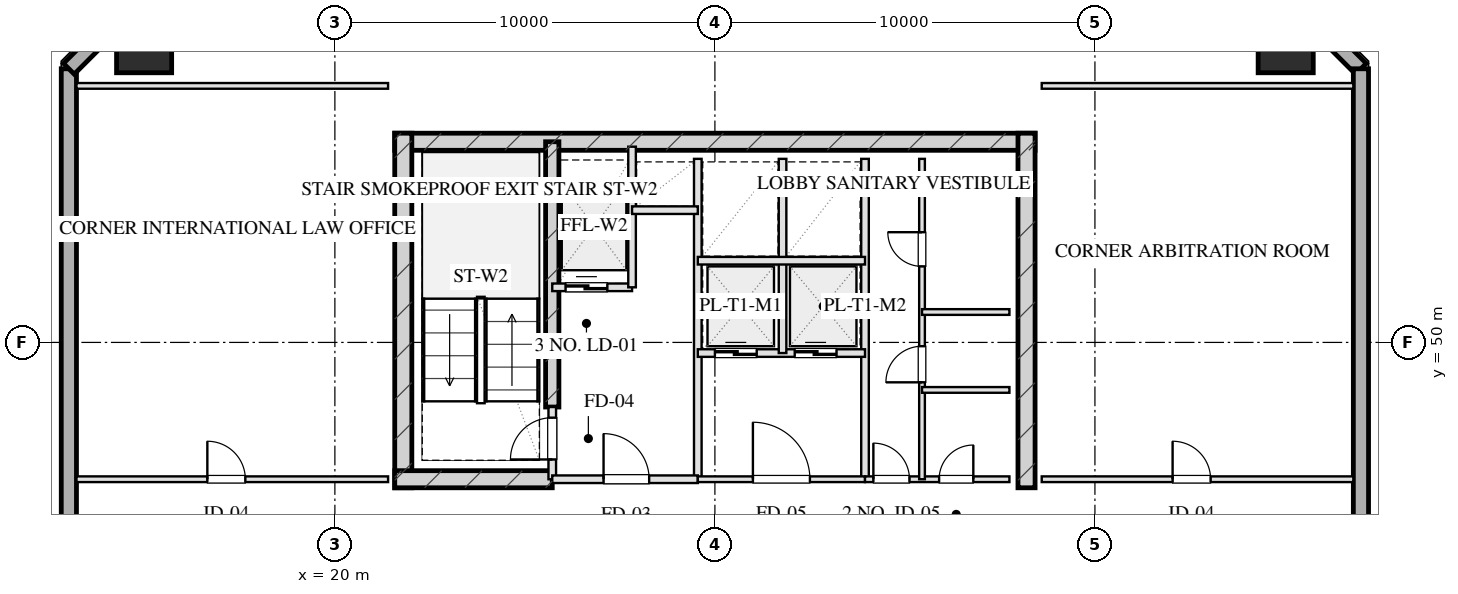
"""IFC4 building model, lengths in metres.
Left out: names, types, materials, properties, quantities, classifications, styles, units other than length and angle.
Written with IfcOpenShell. Run it as: python <this file> out.ifc"""

import sys

from ifc_helpers import new_model, si_unit, direction, frame, frame_2d, origin, origin_2d, place, context, subcontext, project, spatial, rectangle, hollow_rectangle, extrude, element, fill, save


model = new_model("IFC4")
c1 = context("Model", 3, precision=1e-05, world=origin(), true_north=direction((0.0, 1.0)))
c2 = subcontext(c1, "Body", "Model", "MODEL_VIEW")
j1 = project(units=[si_unit("LENGTHUNIT", "METRE"), si_unit("PLANEANGLEUNIT", "RADIAN")], contexts=[c1])
p1 = place(None, origin())
s1 = spatial("IfcSite", under=j1, at=p1, CompositionType="ELEMENT")
p2 = place(p1, origin())
s2 = spatial("IfcBuilding", under=s1, at=p2, CompositionType="ELEMENT")
p3 = place(p2, frame((0.0, 0.0, 195.5)))
s3 = spatial("IfcBuildingStorey", under=s2, at=p3, CompositionType="ELEMENT", Elevation=195.5)
p4 = place(p3, frame((21.575, 55.28, 0.0), z_axis=(0.0, 0.0, 1.0), x_axis=(1.0, 0.0, 0.0)))
e1 = element("IfcWall", 1, at=p4, inside=s3, PredefinedType="SHEAR", context=c2, shape_type="SweptSolid", body=[
    extrude(rectangle(XDim=16.85, YDim=0.45, at=frame_2d((8.425, 0.0))), origin(), (0.0, 0.0, 1.0), 3.45),
])
for number, where, z_axis, x_axis in (
    (2, (21.8, 46.175, 0.0), (0.0, 0.0, 1.0), (0.0, 1.0, 0.0)),
    (3, (38.2, 46.175, 0.0), (0.0, 0.0, 1.0), (0.0, 1.0, 0.0)),
):
    element("IfcWall", number, at=place(p3, frame(where, z_axis=z_axis, x_axis=x_axis)), inside=s3, PredefinedType="SHEAR", context=c2, shape_type="SweptSolid", body=[
        extrude(rectangle(XDim=9.33, YDim=0.45, at=frame_2d((4.665, 0.0))), origin(), (0.0, 0.0, 1.0), 3.45),
    ])
p5 = place(p3, frame((25.72, 48.3, 0.0), z_axis=(0.0, 0.0, 1.0), x_axis=(0.0, 1.0, 0.0)))
e4 = element("IfcWall", 4, at=p5, inside=s3, PredefinedType="SHEAR", context=c2, shape_type="SweptSolid", body=[
    extrude(rectangle(XDim=6.98, YDim=0.35, at=frame_2d((3.49, 0.0))), origin(), (0.0, 0.0, 1.0), 3.45),
])
p6 = place(p3, frame((21.575, 46.4, 0.0), z_axis=(0.0, 0.0, 1.0), x_axis=(1.0, 0.0, 0.0)))
e5 = element("IfcWall", 5, at=p6, inside=s3, PredefinedType="SHEAR", context=c2, shape_type="SweptSolid", body=[
    extrude(rectangle(XDim=4.145, YDim=0.45, at=frame_2d((2.073, 0.0))), origin(), (0.0, 0.0, 1.0), 3.45),
])
for number, where, z_axis, x_axis in (
    (6, (45.02, 57.82, 0.0), (0.0, 0.0, 1.0), (1.0, 0.0, 0.0)),
    (7, (14.98, 57.82, 0.0), (0.0, 0.0, 1.0), (1.0, 0.0, 0.0)),
):
    element("IfcColumn", number, at=place(p3, frame(where, z_axis=z_axis, x_axis=x_axis)), inside=s3, PredefinedType="COLUMN", context=c2, shape_type="SweptSolid", body=[
        extrude(hollow_rectangle(XDim=1.45, YDim=1.45, WallThickness=0.05, at=origin_2d()), origin(), (0.0, 0.0, 1.0), 3.451),
    ])
p7 = place(p3, frame((13.0, 10.8, 0.0), z_axis=(0.0, 0.0, 1.0), x_axis=(0.0, 1.0, 0.0)))
e8 = element("IfcWall", 8, at=p7, inside=s3, PredefinedType="SOLIDWALL", context=c2, shape_type="SweptSolid", body=[
    extrude(rectangle(XDim=46.4, YDim=0.4, at=frame_2d((23.2, 0.0))), origin(), (0.0, 0.0, 1.0), 2.61),
])
p8 = place(p7, frame((24.75, 0.0, 0.75)))
e9 = element("IfcOpeningElement", 9, at=p8, cuts=e8, PredefinedType="OPENING", context=c2, shape_type="SweptSolid", body=[
    extrude(rectangle(XDim=2.1, YDim=1.46, at=frame_2d((1.05, 0.73))), frame((0.0, 0.21, 0.0), z_axis=(0.0, -1.0, 0.0), x_axis=(1.0, 0.0, 0.0)), (0.0, 0.0, 1.0), 0.42),
])
p9 = place(p7, frame((28.55, 0.0, 0.75)))
e10 = element("IfcOpeningElement", 10, at=p9, cuts=e8, PredefinedType="OPENING", context=c2, shape_type="SweptSolid", body=[
    extrude(rectangle(XDim=2.1, YDim=1.46, at=frame_2d((1.05, 0.73))), frame((0.0, 0.21, 0.0), z_axis=(0.0, -1.0, 0.0), x_axis=(1.0, 0.0, 0.0)), (0.0, 0.0, 1.0), 0.42),
])
p10 = place(p7, frame((19.55, 0.0, 0.0)))
e11 = element("IfcOpeningElement", 11, at=p10, cuts=e8, PredefinedType="OPENING", context=c2, shape_type="SweptSolid", body=[
    extrude(rectangle(XDim=1.1, YDim=2.15, at=frame_2d((0.55, 1.075))), frame((0.0, 0.21, 0.0), z_axis=(0.0, -1.0, 0.0), x_axis=(1.0, 0.0, 0.0)), (0.0, 0.0, 1.0), 0.42),
])
for number, where, z_axis, x_axis in (
    (12, (13.0, 57.2, 0.0), (0.0, 0.0, 1.0), (0.707, 0.707, 0.0)),
    (13, (44.4, 59.8, 0.0), (0.0, 0.0, 1.0), (0.707, -0.707, 0.0)),
):
    element("IfcWall", number, at=place(p3, frame(where, z_axis=z_axis, x_axis=x_axis)), inside=s3, PredefinedType="SOLIDWALL", context=c2, shape_type="SweptSolid", body=[
        extrude(rectangle(XDim=3.677, YDim=0.4, at=frame_2d((1.838, 0.0))), origin(), (0.0, 0.0, 1.0), 2.61),
    ])
p11 = place(p3, frame((47.0, 57.2, 0.0), z_axis=(0.0, 0.0, 1.0), x_axis=(0.0, -1.0, 0.0)))
e14 = element("IfcWall", 14, at=p11, inside=s3, PredefinedType="SOLIDWALL", context=c2, shape_type="SweptSolid", body=[
    extrude(rectangle(XDim=46.4, YDim=0.4, at=frame_2d((23.2, 0.0))), origin(), (0.0, 0.0, 1.0), 2.61),
])
p12 = place(p11, frame((19.55, 0.0, 0.75)))
e15 = element("IfcOpeningElement", 15, at=p12, cuts=e14, PredefinedType="OPENING", context=c2, shape_type="SweptSolid", body=[
    extrude(rectangle(XDim=2.1, YDim=1.46, at=frame_2d((1.05, 0.73))), frame((0.0, 0.21, 0.0), z_axis=(0.0, -1.0, 0.0), x_axis=(1.0, 0.0, 0.0)), (0.0, 0.0, 1.0), 0.42),
])
p13 = place(p11, frame((15.75, 0.0, 0.75)))
e16 = element("IfcOpeningElement", 16, at=p13, cuts=e14, PredefinedType="OPENING", context=c2, shape_type="SweptSolid", body=[
    extrude(rectangle(XDim=2.1, YDim=1.46, at=frame_2d((1.05, 0.73))), frame((0.0, 0.21, 0.0), z_axis=(0.0, -1.0, 0.0), x_axis=(1.0, 0.0, 0.0)), (0.0, 0.0, 1.0), 0.42),
])
p14 = place(p11, frame((27.05, 0.0, 0.0)))
e17 = element("IfcOpeningElement", 17, at=p14, cuts=e14, PredefinedType="OPENING", context=c2, shape_type="SweptSolid", body=[
    extrude(rectangle(XDim=1.1, YDim=2.15, at=frame_2d((0.55, 1.075))), frame((0.0, 0.21, 0.0), z_axis=(0.0, -1.0, 0.0), x_axis=(1.0, 0.0, 0.0)), (0.0, 0.0, 1.0), 0.42),
])
p15 = place(p3, frame((25.72, 46.4, 0.0), z_axis=(0.0, 0.0, 1.0), x_axis=(0.0, 1.0, 0.0)))
e18 = element("IfcWall", 18, at=p15, inside=s3, PredefinedType="PARTITIONING", context=c2, shape_type="SweptSolid", body=[
    extrude(rectangle(XDim=1.9, YDim=0.2, at=frame_2d((0.95, 0.0))), origin(), (0.0, 0.0, 1.0), 3.175),
])
p16 = place(p15, frame((0.52, 0.0, 0.0)))
e19 = element("IfcOpeningElement", 19, at=p16, cuts=e18, PredefinedType="OPENING", context=c2, shape_type="SweptSolid", body=[
    extrude(rectangle(XDim=1.1, YDim=2.05, at=frame_2d((0.55, 1.025))), frame((0.0, 0.11, 0.0), z_axis=(0.0, -1.0, 0.0), x_axis=(1.0, 0.0, 0.0)), (0.0, 0.0, 1.0), 0.22),
])
p17 = place(p3, frame((29.55, 46.4, 0.0), z_axis=(0.0, 0.0, 1.0), x_axis=(0.0, 1.0, 0.0)))
e20 = element("IfcWall", 20, at=p17, inside=s3, PredefinedType="PARTITIONING", context=c2, shape_type="SweptSolid", body=[
    extrude(rectangle(XDim=8.43, YDim=0.2, at=frame_2d((4.215, 0.0))), origin(), (0.0, 0.0, 1.0), 3.175),
])
p18 = place(p3, frame((25.72, 46.4, 0.0), z_axis=(0.0, 0.0, 1.0), x_axis=(1.0, 0.0, 0.0)))
e21 = element("IfcWall", 21, at=p18, inside=s3, PredefinedType="PARTITIONING", context=c2, shape_type="SweptSolid", body=[
    extrude(rectangle(XDim=3.83, YDim=0.2, at=frame_2d((1.915, 0.0))), origin(), (0.0, 0.0, 1.0), 3.175),
])
p19 = place(p18, frame((1.35, 0.0, 0.0)))
e22 = element("IfcOpeningElement", 22, at=p19, cuts=e21, PredefinedType="OPENING", context=c2, shape_type="SweptSolid", body=[
    extrude(rectangle(XDim=1.2, YDim=2.05, at=frame_2d((0.6, 1.025))), frame((0.0, 0.11, 0.0), z_axis=(0.0, -1.0, 0.0), x_axis=(1.0, 0.0, 0.0)), (0.0, 0.0, 1.0), 0.22),
])
p20 = place(p3, frame((25.72, 51.45, 0.0), z_axis=(0.0, 0.0, 1.0), x_axis=(1.0, 0.0, 0.0)))
e23 = element("IfcWall", 23, at=p20, inside=s3, PredefinedType="PARTITIONING", context=c2, shape_type="SweptSolid", body=[
    extrude(rectangle(XDim=2.1, YDim=0.2, at=frame_2d((1.05, 0.0))), origin(), (0.0, 0.0, 1.0), 3.175),
])
p21 = place(p20, frame((0.35, 0.0, 0.0)))
e24 = element("IfcOpeningElement", 24, at=p21, cuts=e23, PredefinedType="OPENING", context=c2, shape_type="SweptSolid", body=[
    extrude(rectangle(XDim=1.1, YDim=2.05, at=frame_2d((0.55, 1.025))), frame((0.0, 0.11, 0.0), z_axis=(0.0, -1.0, 0.0), x_axis=(1.0, 0.0, 0.0)), (0.0, 0.0, 1.0), 0.22),
])
p22 = place(p3, frame((27.82, 51.45, 0.0), z_axis=(0.0, 0.0, 1.0), x_axis=(0.0, 1.0, 0.0)))
e25 = element("IfcWall", 25, at=p22, inside=s3, PredefinedType="PARTITIONING", context=c2, shape_type="SweptSolid", body=[
    extrude(rectangle(XDim=3.7, YDim=0.2, at=frame_2d((1.85, 0.0))), origin(), (0.0, 0.0, 1.0), 3.175),
])
p23 = place(p3, frame((27.82, 53.48, 0.0), z_axis=(0.0, 0.0, 1.0), x_axis=(1.0, 0.0, 0.0)))
e26 = element("IfcWall", 26, at=p23, inside=s3, PredefinedType="PARTITIONING", context=c2, shape_type="SweptSolid", body=[
    extrude(rectangle(XDim=1.73, YDim=0.2, at=frame_2d((0.865, 0.0))), origin(), (0.0, 0.0, 1.0), 3.175),
])
p24 = place(p3, frame((33.95, 46.4, 0.0), z_axis=(0.0, 0.0, 1.0), x_axis=(0.0, 1.0, 0.0)))
e27 = element("IfcWall", 27, at=p24, inside=s3, PredefinedType="PARTITIONING", context=c2, shape_type="SweptSolid", body=[
    extrude(rectangle(XDim=8.43, YDim=0.2, at=frame_2d((4.215, 0.0))), origin(), (0.0, 0.0, 1.0), 3.175),
])
p25 = place(p3, frame((29.55, 46.4, 0.0), z_axis=(0.0, 0.0, 1.0), x_axis=(1.0, 0.0, 0.0)))
e28 = element("IfcWall", 28, at=p25, inside=s3, PredefinedType="PARTITIONING", context=c2, shape_type="SweptSolid", body=[
    extrude(rectangle(XDim=4.4, YDim=0.15, at=frame_2d((2.2, 0.0))), origin(), (0.0, 0.0, 1.0), 3.175),
])
p26 = place(p25, frame((1.45, 0.0, 0.0)))
e29 = element("IfcOpeningElement", 29, at=p26, cuts=e28, PredefinedType="OPENING", context=c2, shape_type="SweptSolid", body=[
    extrude(rectangle(XDim=1.5, YDim=2.05, at=frame_2d((0.75, 1.025))), frame((0.0, 0.085, 0.0), z_axis=(0.0, -1.0, 0.0), x_axis=(1.0, 0.0, 0.0)), (0.0, 0.0, 1.0), 0.17),
])
p27 = place(p3, frame((29.55, 49.72, 0.0), z_axis=(0.0, 0.0, 1.0), x_axis=(1.0, 0.0, 0.0)))
e30 = element("IfcWall", 30, at=p27, inside=s3, PredefinedType="PARTITIONING", context=c2, shape_type="SweptSolid", body=[
    extrude(rectangle(XDim=4.4, YDim=0.2, at=frame_2d((2.2, 0.0))), origin(), (0.0, 0.0, 1.0), 3.175),
])
p28 = place(p27, frame((0.45, 0.0, 0.0)))
e31 = element("IfcOpeningElement", 31, at=p28, cuts=e30, PredefinedType="OPENING", context=c2, shape_type="SweptSolid", body=[
    extrude(rectangle(XDim=1.1, YDim=2.05, at=frame_2d((0.55, 1.025))), frame((0.0, 0.11, 0.0), z_axis=(0.0, -1.0, 0.0), x_axis=(1.0, 0.0, 0.0)), (0.0, 0.0, 1.0), 0.22),
])
p29 = place(p27, frame((2.55, 0.0, 0.0)))
e32 = element("IfcOpeningElement", 32, at=p29, cuts=e30, PredefinedType="OPENING", context=c2, shape_type="SweptSolid", body=[
    extrude(rectangle(XDim=1.1, YDim=2.05, at=frame_2d((0.55, 1.025))), frame((0.0, 0.11, 0.0), z_axis=(0.0, -1.0, 0.0), x_axis=(1.0, 0.0, 0.0)), (0.0, 0.0, 1.0), 0.22),
])
p30 = place(p3, frame((31.78, 49.72, 0.0), z_axis=(0.0, 0.0, 1.0), x_axis=(0.0, 1.0, 0.0)))
e33 = element("IfcWall", 33, at=p30, inside=s3, PredefinedType="PARTITIONING", context=c2, shape_type="SweptSolid", body=[
    extrude(rectangle(XDim=5.11, YDim=0.2, at=frame_2d((2.555, 0.0))), origin(), (0.0, 0.0, 1.0), 3.175),
])
p31 = place(p3, frame((29.55, 52.15, 0.0), z_axis=(0.0, 0.0, 1.0), x_axis=(1.0, 0.0, 0.0)))
e34 = element("IfcWall", 34, at=p31, inside=s3, PredefinedType="PARTITIONING", context=c2, shape_type="SweptSolid", body=[
    extrude(rectangle(XDim=4.4, YDim=0.2, at=frame_2d((2.2, 0.0))), origin(), (0.0, 0.0, 1.0), 3.175),
])
p32 = place(p3, frame((33.95, 46.4, 0.0), z_axis=(0.0, 0.0, 1.0), x_axis=(1.0, 0.0, 0.0)))
e35 = element("IfcWall", 35, at=p32, inside=s3, PredefinedType="PARTITIONING", context=c2, shape_type="SweptSolid", body=[
    extrude(rectangle(XDim=3.8, YDim=0.15, at=frame_2d((1.9, 0.0))), origin(), (0.0, 0.0, 1.0), 3.175),
])
p33 = place(p32, frame((0.22, 0.0, 0.0)))
e36 = element("IfcOpeningElement", 36, at=p33, cuts=e35, PredefinedType="OPENING", context=c2, shape_type="SweptSolid", body=[
    extrude(rectangle(XDim=0.95, YDim=2.05, at=frame_2d((0.475, 1.025))), frame((0.0, 0.085, 0.0), z_axis=(0.0, -1.0, 0.0), x_axis=(1.0, 0.0, 0.0)), (0.0, 0.0, 1.0), 0.17),
])
p34 = place(p32, frame((1.95, 0.0, 0.0)))
e37 = element("IfcOpeningElement", 37, at=p34, cuts=e35, PredefinedType="OPENING", context=c2, shape_type="SweptSolid", body=[
    extrude(rectangle(XDim=0.9, YDim=2.05, at=frame_2d((0.45, 1.025))), frame((0.0, 0.085, 0.0), z_axis=(0.0, -1.0, 0.0), x_axis=(1.0, 0.0, 0.0)), (0.0, 0.0, 1.0), 0.17),
])
p35 = place(p3, frame((35.45, 46.4, 0.0), z_axis=(0.0, 0.0, 1.0), x_axis=(0.0, 1.0, 0.0)))
e38 = element("IfcWall", 38, at=p35, inside=s3, PredefinedType="PARTITIONING", context=c2, shape_type="SweptSolid", body=[
    extrude(rectangle(XDim=8.43, YDim=0.15, at=frame_2d((4.215, 0.0))), origin(), (0.0, 0.0, 1.0), 2.765),
])
p36 = place(p35, frame((2.55, 0.0, 0.0)))
e39 = element("IfcOpeningElement", 39, at=p36, cuts=e38, PredefinedType="OPENING", context=c2, shape_type="SweptSolid", body=[
    extrude(rectangle(XDim=0.95, YDim=2.05, at=frame_2d((0.475, 1.025))), frame((0.0, 0.085, 0.0), z_axis=(0.0, -1.0, 0.0), x_axis=(1.0, 0.0, 0.0)), (0.0, 0.0, 1.0), 0.17),
])
p37 = place(p35, frame((5.6, 0.0, 0.0)))
e40 = element("IfcOpeningElement", 40, at=p37, cuts=e38, PredefinedType="OPENING", context=c2, shape_type="SweptSolid", body=[
    extrude(rectangle(XDim=0.9, YDim=2.05, at=frame_2d((0.45, 1.025))), frame((0.0, 0.085, 0.0), z_axis=(0.0, -1.0, 0.0), x_axis=(1.0, 0.0, 0.0)), (0.0, 0.0, 1.0), 0.17),
])
for number, where, z_axis, x_axis in (
    (41, (35.45, 50.8, 0.0), (0.0, 0.0, 1.0), (1.0, 0.0, 0.0)),
    (42, (35.45, 48.75, 0.0), (0.0, 0.0, 1.0), (1.0, 0.0, 0.0)),
):
    element("IfcWall", number, at=place(p3, frame(where, z_axis=z_axis, x_axis=x_axis)), inside=s3, PredefinedType="PARTITIONING", context=c2, shape_type="SweptSolid", body=[
        extrude(rectangle(XDim=2.3, YDim=0.15, at=frame_2d((1.15, 0.0))), origin(), (0.0, 0.0, 1.0), 3.175),
    ])
p38 = place(p3, frame((13.2, 56.75, 0.0), z_axis=(0.0, 0.0, 1.0), x_axis=(1.0, 0.0, 0.0)))
e43 = element("IfcWall", 43, at=p38, inside=s3, PredefinedType="PARTITIONING", context=c2, shape_type="SweptSolid", body=[
    extrude(rectangle(XDim=8.2, YDim=0.15, at=frame_2d((4.1, 0.0))), origin(), (0.0, 0.0, 1.0), 3.175),
])
p39 = place(p3, frame((13.2, 46.4, 0.0), z_axis=(0.0, 0.0, 1.0), x_axis=(1.0, 0.0, 0.0)))
e44 = element("IfcWall", 44, at=p39, inside=s3, PredefinedType="PARTITIONING", context=c2, shape_type="SweptSolid", body=[
    extrude(rectangle(XDim=8.2, YDim=0.15, at=frame_2d((4.1, 0.0))), origin(), (0.0, 0.0, 1.0), 3.175),
])
p40 = place(p39, frame((3.444, 0.0, 0.0)))
e45 = element("IfcOpeningElement", 45, at=p40, cuts=e44, PredefinedType="OPENING", context=c2, shape_type="SweptSolid", body=[
    extrude(rectangle(XDim=1.0, YDim=2.05, at=frame_2d((0.5, 1.025))), frame((0.0, 0.085, 0.0), z_axis=(0.0, -1.0, 0.0), x_axis=(1.0, 0.0, 0.0)), (0.0, 0.0, 1.0), 0.17),
])
p41 = place(p3, frame((38.6, 56.75, 0.0), z_axis=(0.0, 0.0, 1.0), x_axis=(1.0, 0.0, 0.0)))
e46 = element("IfcWall", 46, at=p41, inside=s3, PredefinedType="PARTITIONING", context=c2, shape_type="SweptSolid", body=[
    extrude(rectangle(XDim=8.2, YDim=0.15, at=frame_2d((4.1, 0.0))), origin(), (0.0, 0.0, 1.0), 3.175),
])
p42 = place(p3, frame((38.6, 46.4, 0.0), z_axis=(0.0, 0.0, 1.0), x_axis=(1.0, 0.0, 0.0)))
e47 = element("IfcWall", 47, at=p42, inside=s3, PredefinedType="PARTITIONING", context=c2, shape_type="SweptSolid", body=[
    extrude(rectangle(XDim=8.2, YDim=0.15, at=frame_2d((4.1, 0.0))), origin(), (0.0, 0.0, 1.0), 3.175),
])
p43 = place(p42, frame((3.444, 0.0, 0.0)))
e48 = element("IfcOpeningElement", 48, at=p43, cuts=e47, PredefinedType="OPENING", context=c2, shape_type="SweptSolid", body=[
    extrude(rectangle(XDim=1.0, YDim=2.05, at=frame_2d((0.5, 1.025))), frame((0.0, 0.085, 0.0), z_axis=(0.0, -1.0, 0.0), x_axis=(1.0, 0.0, 0.0)), (0.0, 0.0, 1.0), 0.17),
])
p44 = place(p16, origin())
e49 = element("IfcDoor", 49, at=p44, inside=s3, OperationType="SINGLE_SWING_LEFT", PredefinedType="DOOR", context=c2, shape_type="SweptSolid", body=[
    extrude(rectangle(XDim=1.1, YDim=2.05, at=frame_2d((0.55, 1.025))), frame((0.0, 0.025, 0.0), z_axis=(0.0, -1.0, 0.0), x_axis=(1.0, 0.0, 0.0)), (0.0, 0.0, 1.0), 0.05),
])
fill(e19, e49)
p45 = place(p19, origin())
e50 = element("IfcDoor", 50, at=p45, inside=s3, OperationType="SINGLE_SWING_LEFT", PredefinedType="DOOR", context=c2, shape_type="SweptSolid", body=[
    extrude(rectangle(XDim=1.2, YDim=2.05, at=frame_2d((0.6, 1.025))), frame((0.0, 0.025, 0.0), z_axis=(0.0, -1.0, 0.0), x_axis=(1.0, 0.0, 0.0)), (0.0, 0.0, 1.0), 0.05),
])
fill(e22, e50)
p46 = place(p21, origin())
e51 = element("IfcDoor", 51, at=p46, inside=s3, OperationType="DOUBLE_DOOR_SLIDING", PredefinedType="DOOR", context=c2, shape_type="SweptSolid", body=[
    extrude(rectangle(XDim=1.1, YDim=2.05, at=frame_2d((0.55, 1.025))), frame((0.0, 0.025, 0.0), z_axis=(0.0, -1.0, 0.0), x_axis=(1.0, 0.0, 0.0)), (0.0, 0.0, 1.0), 0.05),
])
fill(e24, e51)
p47 = place(p26, origin())
e52 = element("IfcDoor", 52, at=p47, inside=s3, OperationType="SINGLE_SWING_LEFT", PredefinedType="DOOR", context=c2, shape_type="SweptSolid", body=[
    extrude(rectangle(XDim=1.5, YDim=2.05, at=frame_2d((0.75, 1.025))), frame((0.0, 0.025, 0.0), z_axis=(0.0, -1.0, 0.0), x_axis=(1.0, 0.0, 0.0)), (0.0, 0.0, 1.0), 0.05),
])
fill(e29, e52)
p48 = place(p28, origin())
e53 = element("IfcDoor", 53, at=p48, inside=s3, OperationType="DOUBLE_DOOR_SLIDING", PredefinedType="DOOR", context=c2, shape_type="SweptSolid", body=[
    extrude(rectangle(XDim=1.1, YDim=2.05, at=frame_2d((0.55, 1.025))), frame((0.0, 0.025, 0.0), z_axis=(0.0, -1.0, 0.0), x_axis=(1.0, 0.0, 0.0)), (0.0, 0.0, 1.0), 0.05),
])
fill(e31, e53)
p49 = place(p29, origin())
e54 = element("IfcDoor", 54, at=p49, inside=s3, OperationType="DOUBLE_DOOR_SLIDING", PredefinedType="DOOR", context=c2, shape_type="SweptSolid", body=[
    extrude(rectangle(XDim=1.1, YDim=2.05, at=frame_2d((0.55, 1.025))), frame((0.0, 0.025, 0.0), z_axis=(0.0, -1.0, 0.0), x_axis=(1.0, 0.0, 0.0)), (0.0, 0.0, 1.0), 0.05),
])
fill(e32, e54)
p50 = place(p33, origin())
e55 = element("IfcDoor", 55, at=p50, inside=s3, OperationType="SINGLE_SWING_LEFT", PredefinedType="DOOR", context=c2, shape_type="SweptSolid", body=[
    extrude(rectangle(XDim=0.95, YDim=2.05, at=frame_2d((0.475, 1.025))), frame((0.0, 0.025, 0.0), z_axis=(0.0, -1.0, 0.0), x_axis=(1.0, 0.0, 0.0)), (0.0, 0.0, 1.0), 0.05),
])
fill(e36, e55)
p51 = place(p34, origin())
e56 = element("IfcDoor", 56, at=p51, inside=s3, OperationType="SINGLE_SWING_RIGHT", PredefinedType="DOOR", context=c2, shape_type="SweptSolid", body=[
    extrude(rectangle(XDim=0.9, YDim=2.05, at=frame_2d((0.45, 1.025))), frame((0.0, 0.025, 0.0), z_axis=(0.0, -1.0, 0.0), x_axis=(1.0, 0.0, 0.0)), (0.0, 0.0, 1.0), 0.05),
])
fill(e37, e56)
p52 = place(p36, origin())
e57 = element("IfcDoor", 57, at=p52, inside=s3, OperationType="SINGLE_SWING_LEFT", PredefinedType="DOOR", context=c2, shape_type="SweptSolid", body=[
    extrude(rectangle(XDim=0.95, YDim=2.05, at=frame_2d((0.475, 1.025))), frame((0.0, 0.025, 0.0), z_axis=(0.0, -1.0, 0.0), x_axis=(1.0, 0.0, 0.0)), (0.0, 0.0, 1.0), 0.05),
])
fill(e39, e57)
p53 = place(p37, origin())
e58 = element("IfcDoor", 58, at=p53, inside=s3, OperationType="SINGLE_SWING_RIGHT", PredefinedType="DOOR", context=c2, shape_type="SweptSolid", body=[
    extrude(rectangle(XDim=0.9, YDim=2.05, at=frame_2d((0.45, 1.025))), frame((0.0, 0.025, 0.0), z_axis=(0.0, -1.0, 0.0), x_axis=(1.0, 0.0, 0.0)), (0.0, 0.0, 1.0), 0.05),
])
fill(e40, e58)
p54 = place(p40, origin())
e59 = element("IfcDoor", 59, at=p54, inside=s3, OperationType="SINGLE_SWING_LEFT", PredefinedType="DOOR", context=c2, shape_type="SweptSolid", body=[
    extrude(rectangle(XDim=1.0, YDim=2.05, at=frame_2d((0.5, 1.025))), frame((0.0, 0.025, 0.0), z_axis=(0.0, -1.0, 0.0), x_axis=(1.0, 0.0, 0.0)), (0.0, 0.0, 1.0), 0.05),
])
fill(e45, e59)
p55 = place(p43, origin())
e60 = element("IfcDoor", 60, at=p55, inside=s3, OperationType="SINGLE_SWING_LEFT", PredefinedType="DOOR", context=c2, shape_type="SweptSolid", body=[
    extrude(rectangle(XDim=1.0, YDim=2.05, at=frame_2d((0.5, 1.025))), frame((0.0, 0.025, 0.0), z_axis=(0.0, -1.0, 0.0), x_axis=(1.0, 0.0, 0.0)), (0.0, 0.0, 1.0), 0.05),
])
fill(e48, e60)
save(model, sys.argv[1])
